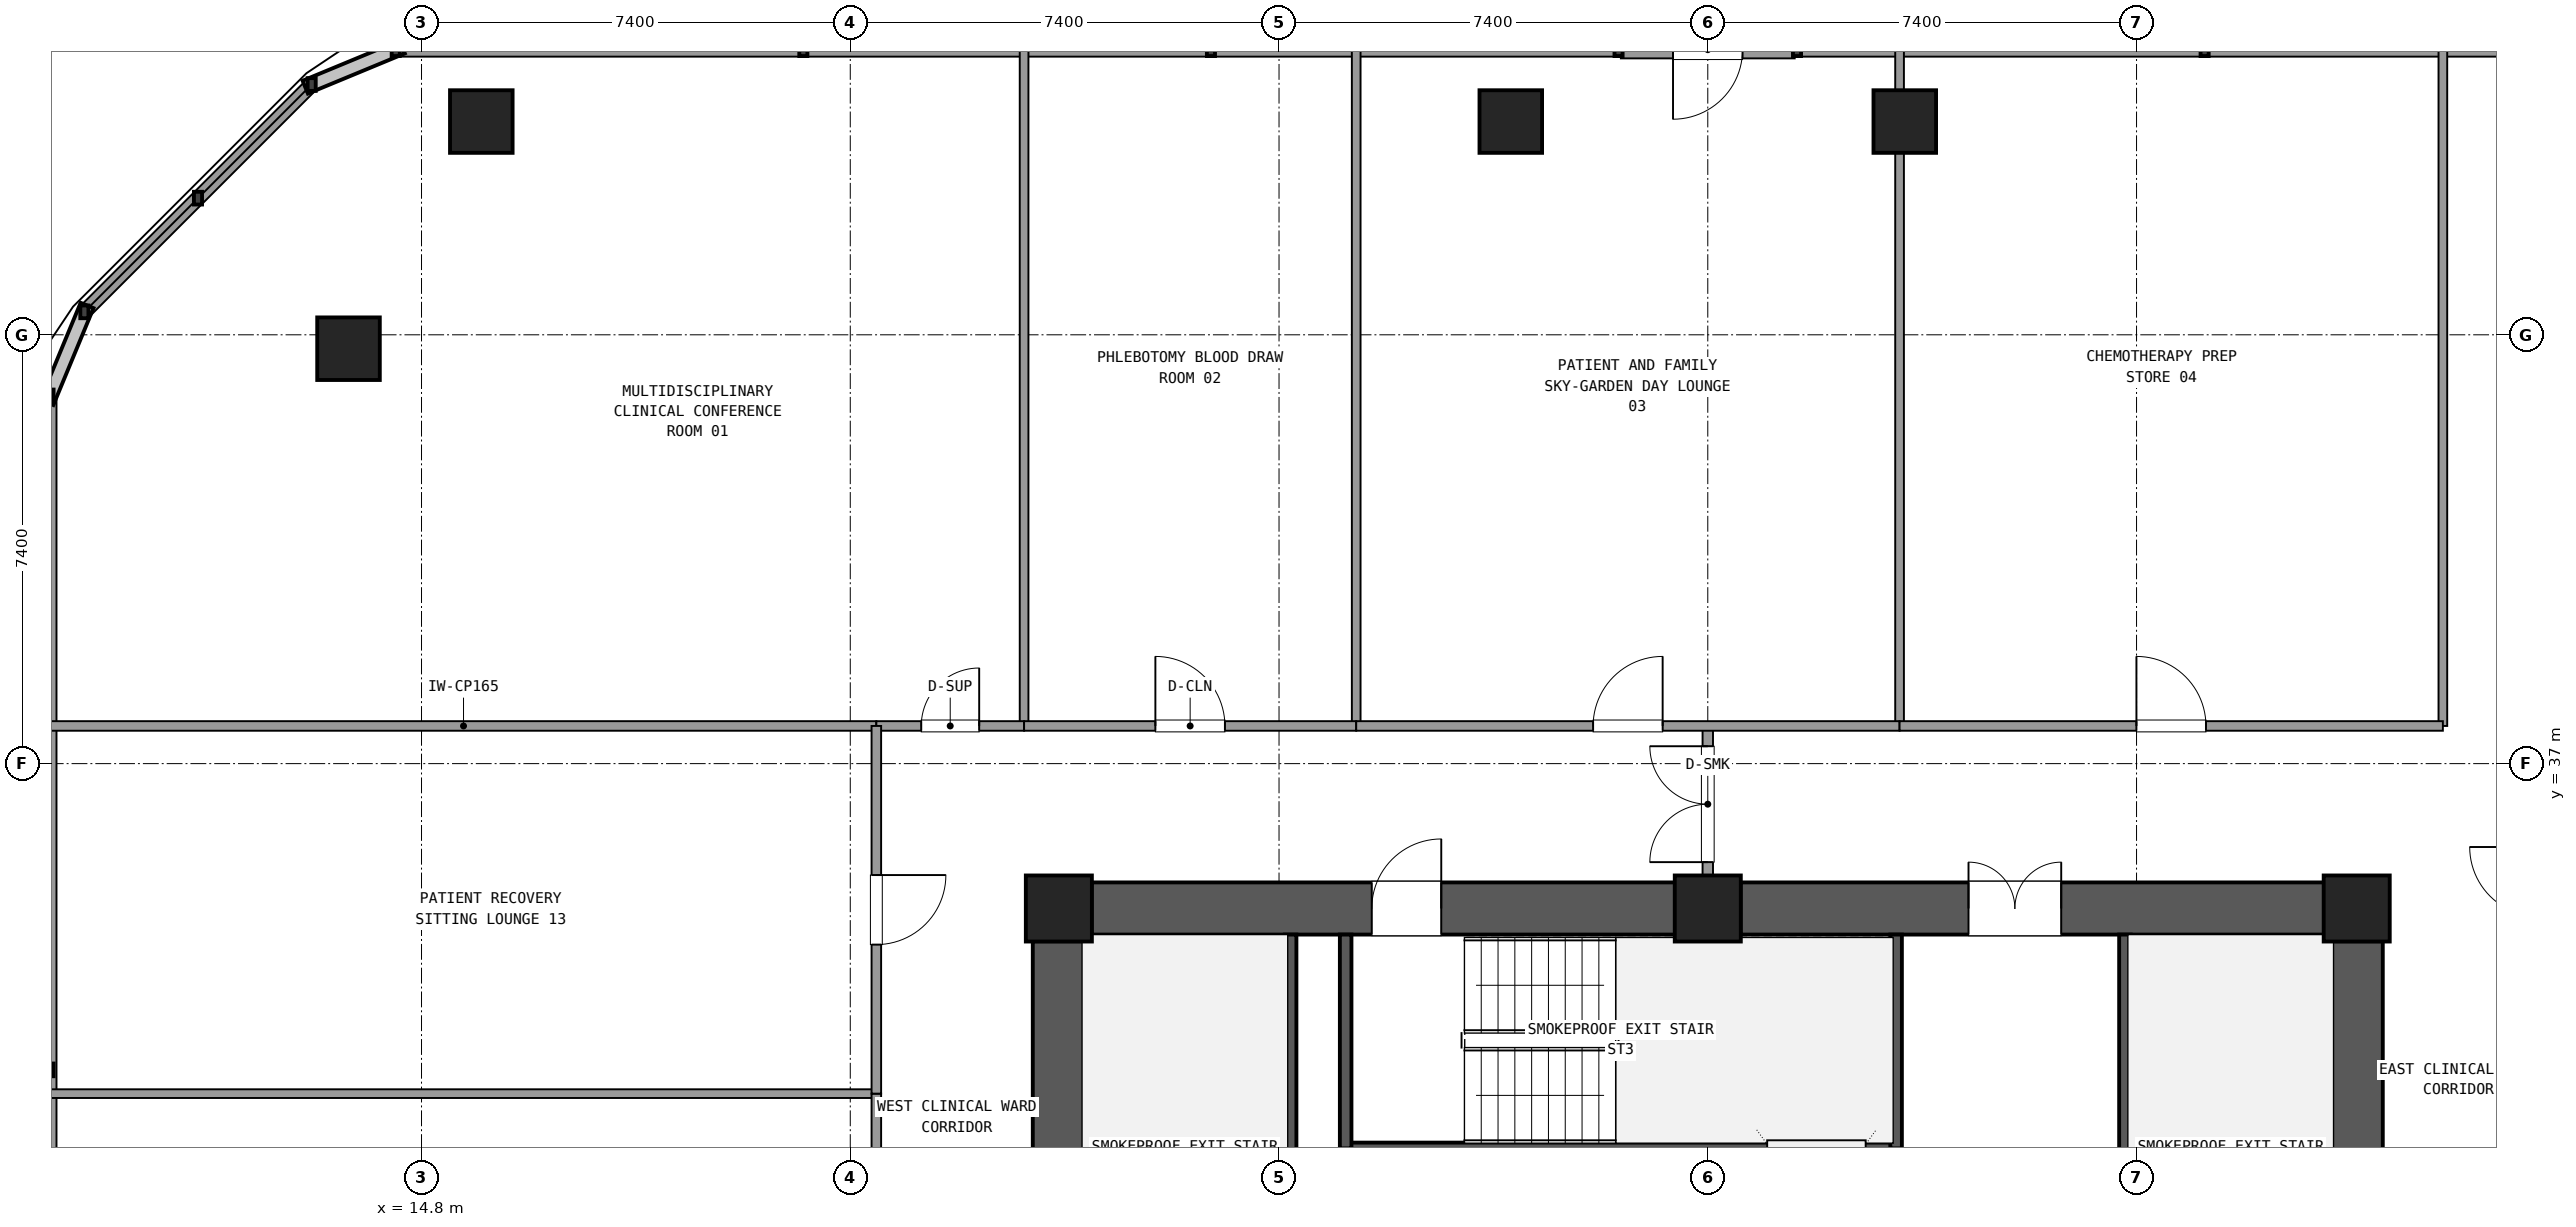
"""IFC4 building model, lengths in metres.
Left out: names, types, materials, properties, quantities, classifications, styles, units other than length and angle.
Written with IfcOpenShell. Run it as: python <this file> out.ifc"""

import sys

from ifc_helpers import new_model, si_unit, direction, frame, frame_2d, origin, origin_2d, place, context, subcontext, project, spatial, rectangle, extrude, element, fill, save


model = new_model("IFC4")
c1 = context("Model", 3, precision=1e-05, world=origin(), true_north=direction((0.0, 1.0)))
c2 = subcontext(c1, "Body", "Model", "MODEL_VIEW")
j1 = project(units=[si_unit("LENGTHUNIT", "METRE"), si_unit("PLANEANGLEUNIT", "RADIAN")], contexts=[c1])
p1 = place(None, origin())
s1 = spatial("IfcSite", under=j1, at=p1, CompositionType="ELEMENT")
p2 = place(p1, origin())
s2 = spatial("IfcBuilding", under=s1, at=p2, CompositionType="ELEMENT")
p3 = place(p2, frame((0.0, 0.0, 59.94)))
s3 = spatial("IfcBuildingStorey", under=s2, at=p3, CompositionType="ELEMENT", Elevation=59.94)
for number, where, z_axis, x_axis in (
    (1, (48.2, 34.5, 0.0), (0.0, 0.0, 1.0), (1.0, 0.0, 0.0)),
    (2, (37.0, 34.5, 0.0), (0.0, 0.0, 1.0), (1.0, 0.0, 0.0)),
    (3, (25.8, 34.5, 0.0), (0.0, 0.0, 1.0), (1.0, 0.0, 0.0)),
):
    element("IfcColumn", number, at=place(p3, frame(where, z_axis=z_axis, x_axis=x_axis)), inside=s3, PredefinedType="COLUMN", context=c2, shape_type="SweptSolid", body=[
        extrude(rectangle(XDim=1.14, YDim=1.14, at=origin_2d()), origin(), (0.0, 0.0, 1.0), 3.6),
    ])
p4 = place(p3, frame((48.2, 26.465, 0.0), z_axis=(0.0, 0.0, 1.0), x_axis=(0.0, 1.0, 0.0)))
e4 = element("IfcWall", 4, at=p4, inside=s3, PredefinedType="SHEAR", context=c2, shape_type="SweptSolid", body=[
    extrude(rectangle(XDim=7.47, YDim=0.9, at=frame_2d((3.735, 0.0))), origin(), (0.0, 0.0, 1.0), 3.32),
])
p5 = place(p3, frame((47.635, 34.5, 0.0), z_axis=(0.0, 0.0, 1.0), x_axis=(-1.0, 0.0, 0.0)))
e5 = element("IfcWall", 5, at=p5, inside=s3, PredefinedType="SHEAR", context=c2, shape_type="SweptSolid", body=[
    extrude(rectangle(XDim=10.07, YDim=0.9, at=frame_2d((5.035, 0.0))), origin(), (0.0, 0.0, 1.0), 3.32),
])
p6 = place(p5, frame((4.535, 0.0, 0.0)))
e6 = element("IfcOpeningElement", 6, at=p6, cuts=e5, PredefinedType="OPENING", context=c2, shape_type="SweptSolid", body=[
    extrude(rectangle(XDim=1.6, YDim=2.2, at=frame_2d((0.8, 1.1))), frame((0.0, 0.46, 0.0), z_axis=(0.0, -1.0, 0.0), x_axis=(1.0, 0.0, 0.0)), (0.0, 0.0, 1.0), 0.92),
])
p7 = place(p3, frame((36.435, 34.5, 0.0), z_axis=(0.0, 0.0, 1.0), x_axis=(-1.0, 0.0, 0.0)))
e7 = element("IfcWall", 7, at=p7, inside=s3, PredefinedType="SHEAR", context=c2, shape_type="SweptSolid", body=[
    extrude(rectangle(XDim=10.07, YDim=0.9, at=frame_2d((5.035, 0.0))), origin(), (0.0, 0.0, 1.0), 3.32),
])
p8 = place(p7, frame((4.035, 0.0, 0.0)))
e8 = element("IfcOpeningElement", 8, at=p8, cuts=e7, PredefinedType="OPENING", context=c2, shape_type="SweptSolid", body=[
    extrude(rectangle(XDim=1.2, YDim=2.15, at=frame_2d((0.6, 1.075))), frame((0.0, 0.46, 0.0), z_axis=(0.0, -1.0, 0.0), x_axis=(1.0, 0.0, 0.0)), (0.0, 0.0, 1.0), 0.92),
])
p9 = place(p3, frame((25.8, 33.935, 0.0), z_axis=(0.0, 0.0, 1.0), x_axis=(0.0, -1.0, 0.0)))
e9 = element("IfcWall", 9, at=p9, inside=s3, PredefinedType="SHEAR", context=c2, shape_type="SweptSolid", body=[
    extrude(rectangle(XDim=7.47, YDim=0.9, at=frame_2d((3.735, 0.0))), origin(), (0.0, 0.0, 1.0), 3.32),
])
for number, where, z_axis, x_axis in (
    (10, (40.4, 48.08, 0.0), (0.0, 0.0, 1.0), (1.0, 0.0, 0.0)),
    (11, (33.6, 48.08, 0.0), (0.0, 0.0, 1.0), (1.0, 0.0, 0.0)),
    (12, (15.832, 48.08, 0.0), (0.0, 0.0, 1.0), (1.0, 0.0, 0.0)),
    (13, (13.54, 44.16, 0.0), (0.0, 0.0, 1.0), (1.0, 0.0, 0.0)),
):
    element("IfcColumn", number, at=place(p3, frame(where, z_axis=z_axis, x_axis=x_axis)), inside=s3, PredefinedType="COLUMN", context=c2, shape_type="SweptSolid", body=[
        extrude(rectangle(XDim=1.08, YDim=1.08, at=origin_2d()), origin(), (0.0, 0.0, 1.0), 3.6),
    ])
p10 = place(p3, frame((38.5, 49.32, 0.0), z_axis=(0.0, 0.0, 1.0), x_axis=(-1.0, 0.0, 0.0)))
e14 = element("IfcWall", 14, at=p10, inside=s3, PredefinedType="SOLIDWALL", context=c2, shape_type="SweptSolid", body=[
    extrude(rectangle(XDim=3.0, YDim=0.3, at=frame_2d((1.5, 0.0))), origin(), (0.0, 0.0, 1.0), 2.65),
])
p11 = place(p10, frame((0.9, 0.0, 0.0)))
e15 = element("IfcOpeningElement", 15, at=p11, cuts=e14, PredefinedType="OPENING", context=c2, shape_type="SweptSolid", body=[
    extrude(rectangle(XDim=1.2, YDim=2.2, at=frame_2d((0.6, 1.1))), frame((0.0, 0.16, 0.0), z_axis=(0.0, -1.0, 0.0), x_axis=(1.0, 0.0, 0.0)), (0.0, 0.0, 1.0), 0.32),
])
for number, where, z_axis, x_axis in (
    (16, (59.645, 49.32, 0.0), (0.0, 0.0, 1.0), (-1.0, 0.0, 0.0)),
    (17, (35.46, 49.32, 0.0), (0.0, 0.0, 1.0), (-1.0, 0.0, 0.0)),
):
    element("IfcWall", number, at=place(p3, frame(where, z_axis=z_axis, x_axis=x_axis)), inside=s3, PredefinedType="SOLIDWALL", context=c2, shape_type="SweptSolid", body=[
        extrude(rectangle(XDim=21.105, YDim=0.24, at=frame_2d((10.552, 0.0))), origin(), (0.0, 0.0, 1.0), 0.85),
    ])
p12 = place(p3, frame((12.904, 48.719, 0.0), z_axis=(0.0, 0.0, 1.0), x_axis=(-0.707106781187, -0.707106781187, 0.0)))
e18 = element("IfcWall", 18, at=p12, inside=s3, PredefinedType="SOLIDWALL", context=c2, shape_type="SweptSolid", body=[
    extrude(rectangle(XDim=5.548, YDim=0.24, at=frame_2d((2.774, 0.0))), origin(), (0.0, 0.0, 1.0), 0.85),
])
p13 = place(p3, frame((8.38, 43.345, 0.0), z_axis=(0.0, 0.0, 1.0), x_axis=(0.0, -1.0, 0.0)))
e19 = element("IfcWall", 19, at=p13, inside=s3, PredefinedType="SOLIDWALL", context=c2, shape_type="SweptSolid", body=[
    extrude(rectangle(XDim=34.89, YDim=0.24, at=frame_2d((17.445, 0.0))), origin(), (0.0, 0.0, 1.0), 0.85),
])
for number, where, z_axis, x_axis in (
    (20, (29.8, 24.65, 0.0), (0.0, 0.0, 1.0), (0.0, 1.0, 0.0)),
    (21, (44.2, 24.65, 0.0), (0.0, 0.0, 1.0), (0.0, 1.0, 0.0)),
):
    element("IfcWall", number, at=place(p3, frame(where, z_axis=z_axis, x_axis=x_axis)), inside=s3, PredefinedType="SHEAR", context=c2, shape_type="SweptSolid", body=[
        extrude(rectangle(XDim=9.4, YDim=0.2, at=frame_2d((4.7, 0.0))), origin(), (0.0, 0.0, 1.0), 3.32),
    ])
p14 = place(p3, frame((30.75, 30.36, 0.0), z_axis=(0.0, 0.0, 1.0), x_axis=(1.0, 0.0, 0.0)))
e22 = element("IfcWall", 22, at=p14, inside=s3, PredefinedType="SHEAR", context=c2, shape_type="SweptSolid", body=[
    extrude(rectangle(XDim=9.5, YDim=0.2, at=frame_2d((4.75, 0.0))), origin(), (0.0, 0.0, 1.0), 3.32),
])
for number, where, z_axis, x_axis in (
    (23, (30.75, 30.36, 0.0), (0.0, 0.0, 1.0), (0.0, 1.0, 0.0)),
    (24, (40.25, 30.36, 0.0), (0.0, 0.0, 1.0), (0.0, 1.0, 0.0)),
):
    element("IfcWall", number, at=place(p3, frame(where, z_axis=z_axis, x_axis=x_axis)), inside=s3, PredefinedType="SHEAR", context=c2, shape_type="SweptSolid", body=[
        extrude(rectangle(XDim=3.69, YDim=0.2, at=frame_2d((1.845, 0.0))), origin(), (0.0, 0.0, 1.0), 3.32),
    ])
p15 = place(p3, frame((37.0, 34.95, 0.0), z_axis=(0.0, 0.0, 1.0), x_axis=(0.0, 1.0, 0.0)))
e25 = element("IfcWall", 25, at=p15, inside=s3, PredefinedType="PARTITIONING", context=c2, shape_type="SweptSolid", body=[
    extrude(rectangle(XDim=2.7, YDim=0.18, at=frame_2d((1.35, 0.0))), origin(), (0.0, 0.0, 1.0), 2.61),
])
p16 = place(p15, frame((0.35, 0.0, 0.0)))
e26 = element("IfcOpeningElement", 26, at=p16, cuts=e25, PredefinedType="OPENING", context=c2, shape_type="SweptSolid", body=[
    extrude(rectangle(XDim=2.0, YDim=2.2, at=frame_2d((1.0, 1.1))), frame((0.0, 0.1, 0.0), z_axis=(0.0, -1.0, 0.0), x_axis=(1.0, 0.0, 0.0)), (0.0, 0.0, 1.0), 0.2),
])
p17 = place(p3, frame((8.4, 37.65, 0.0), z_axis=(0.0, 0.0, 1.0), x_axis=(1.0, 0.0, 0.0)))
e27 = element("IfcWall", 27, at=p17, inside=s3, PredefinedType="PARTITIONING", context=c2, shape_type="SweptSolid", body=[
    extrude(rectangle(XDim=14.25, YDim=0.165, at=frame_2d((7.125, 0.0))), origin(), (0.0, 0.0, 1.0), 2.61),
])
p18 = place(p3, frame((25.2, 37.65, 0.0), z_axis=(0.0, 0.0, 1.0), x_axis=(0.0, 1.0, 0.0)))
e28 = element("IfcWall", 28, at=p18, inside=s3, PredefinedType="PARTITIONING", context=c2, shape_type="SweptSolid", body=[
    extrude(rectangle(XDim=11.65, YDim=0.15, at=frame_2d((5.825, 0.0))), origin(), (0.0, 0.0, 1.0), 2.61),
])
p19 = place(p3, frame((22.65, 37.65, 0.0), z_axis=(0.0, 0.0, 1.0), x_axis=(1.0, 0.0, 0.0)))
e29 = element("IfcWall", 29, at=p19, inside=s3, PredefinedType="PARTITIONING", context=c2, shape_type="SweptSolid", body=[
    extrude(rectangle(XDim=2.55, YDim=0.165, at=frame_2d((1.275, 0.0))), origin(), (0.0, 0.0, 1.0), 2.61),
])
p20 = place(p19, frame((0.775, 0.0, 0.0)))
e30 = element("IfcOpeningElement", 30, at=p20, cuts=e29, PredefinedType="OPENING", context=c2, shape_type="SweptSolid", body=[
    extrude(rectangle(XDim=1.0, YDim=2.15, at=frame_2d((0.5, 1.075))), frame((0.0, 0.093, 0.0), z_axis=(0.0, -1.0, 0.0), x_axis=(1.0, 0.0, 0.0)), (0.0, 0.0, 1.0), 0.185),
])
p21 = place(p3, frame((30.932, 37.65, 0.0), z_axis=(0.0, 0.0, 1.0), x_axis=(0.0, 1.0, 0.0)))
e31 = element("IfcWall", 31, at=p21, inside=s3, PredefinedType="PARTITIONING", context=c2, shape_type="SweptSolid", body=[
    extrude(rectangle(XDim=11.65, YDim=0.15, at=frame_2d((5.825, 0.0))), origin(), (0.0, 0.0, 1.0), 2.61),
])
p22 = place(p3, frame((25.2, 37.65, 0.0), z_axis=(0.0, 0.0, 1.0), x_axis=(1.0, 0.0, 0.0)))
e32 = element("IfcWall", 32, at=p22, inside=s3, PredefinedType="PARTITIONING", context=c2, shape_type="SweptSolid", body=[
    extrude(rectangle(XDim=5.732, YDim=0.165, at=frame_2d((2.866, 0.0))), origin(), (0.0, 0.0, 1.0), 2.61),
])
p23 = place(p22, frame((2.266, 0.0, 0.0)))
e33 = element("IfcOpeningElement", 33, at=p23, cuts=e32, PredefinedType="OPENING", context=c2, shape_type="SweptSolid", body=[
    extrude(rectangle(XDim=1.2, YDim=2.15, at=frame_2d((0.6, 1.075))), frame((0.0, 0.093, 0.0), z_axis=(0.0, -1.0, 0.0), x_axis=(1.0, 0.0, 0.0)), (0.0, 0.0, 1.0), 0.185),
])
p24 = place(p3, frame((40.31, 37.65, 0.0), z_axis=(0.0, 0.0, 1.0), x_axis=(0.0, 1.0, 0.0)))
e34 = element("IfcWall", 34, at=p24, inside=s3, PredefinedType="PARTITIONING", context=c2, shape_type="SweptSolid", body=[
    extrude(rectangle(XDim=11.65, YDim=0.15, at=frame_2d((5.825, 0.0))), origin(), (0.0, 0.0, 1.0), 2.61),
])
p25 = place(p3, frame((30.932, 37.65, 0.0), z_axis=(0.0, 0.0, 1.0), x_axis=(1.0, 0.0, 0.0)))
e35 = element("IfcWall", 35, at=p25, inside=s3, PredefinedType="PARTITIONING", context=c2, shape_type="SweptSolid", body=[
    extrude(rectangle(XDim=9.378, YDim=0.165, at=frame_2d((4.689, 0.0))), origin(), (0.0, 0.0, 1.0), 2.61),
])
p26 = place(p25, frame((4.089, 0.0, 0.0)))
e36 = element("IfcOpeningElement", 36, at=p26, cuts=e35, PredefinedType="OPENING", context=c2, shape_type="SweptSolid", body=[
    extrude(rectangle(XDim=1.2, YDim=2.15, at=frame_2d((0.6, 1.075))), frame((0.0, 0.093, 0.0), z_axis=(0.0, -1.0, 0.0), x_axis=(1.0, 0.0, 0.0)), (0.0, 0.0, 1.0), 0.185),
])
p27 = place(p3, frame((49.687, 37.65, 0.0), z_axis=(0.0, 0.0, 1.0), x_axis=(0.0, 1.0, 0.0)))
e37 = element("IfcWall", 37, at=p27, inside=s3, PredefinedType="PARTITIONING", context=c2, shape_type="SweptSolid", body=[
    extrude(rectangle(XDim=11.65, YDim=0.15, at=frame_2d((5.825, 0.0))), origin(), (0.0, 0.0, 1.0), 2.61),
])
p28 = place(p3, frame((40.31, 37.65, 0.0), z_axis=(0.0, 0.0, 1.0), x_axis=(1.0, 0.0, 0.0)))
e38 = element("IfcWall", 38, at=p28, inside=s3, PredefinedType="PARTITIONING", context=c2, shape_type="SweptSolid", body=[
    extrude(rectangle(XDim=9.377, YDim=0.165, at=frame_2d((4.688, 0.0))), origin(), (0.0, 0.0, 1.0), 2.61),
])
p29 = place(p28, frame((4.088, 0.0, 0.0)))
e39 = element("IfcOpeningElement", 39, at=p29, cuts=e38, PredefinedType="OPENING", context=c2, shape_type="SweptSolid", body=[
    extrude(rectangle(XDim=1.2, YDim=2.15, at=frame_2d((0.6, 1.075))), frame((0.0, 0.093, 0.0), z_axis=(0.0, -1.0, 0.0), x_axis=(1.0, 0.0, 0.0)), (0.0, 0.0, 1.0), 0.185),
])
p30 = place(p3, frame((22.65, 31.305, 0.0), z_axis=(0.0, 0.0, 1.0), x_axis=(-1.0, 0.0, 0.0)))
e40 = element("IfcWall", 40, at=p30, inside=s3, PredefinedType="PARTITIONING", context=c2, shape_type="SweptSolid", body=[
    extrude(rectangle(XDim=14.25, YDim=0.15, at=frame_2d((7.125, 0.0))), origin(), (0.0, 0.0, 1.0), 2.61),
])
p31 = place(p3, frame((22.65, 23.315, 0.0), z_axis=(0.0, 0.0, 1.0), x_axis=(0.0, 1.0, 0.0)))
e41 = element("IfcWall", 41, at=p31, inside=s3, PredefinedType="PARTITIONING", context=c2, shape_type="SweptSolid", body=[
    extrude(rectangle(XDim=7.99, YDim=0.165, at=frame_2d((3.995, 0.0))), origin(), (0.0, 0.0, 1.0), 2.61),
])
p32 = place(p31, frame((3.395, 0.0, 0.0)))
e42 = element("IfcOpeningElement", 42, at=p32, cuts=e41, PredefinedType="OPENING", context=c2, shape_type="SweptSolid", body=[
    extrude(rectangle(XDim=1.2, YDim=2.15, at=frame_2d((0.6, 1.075))), frame((0.0, 0.093, 0.0), z_axis=(0.0, -1.0, 0.0), x_axis=(1.0, 0.0, 0.0)), (0.0, 0.0, 1.0), 0.185),
])
p33 = place(p3, frame((22.65, 31.305, 0.0), z_axis=(0.0, 0.0, 1.0), x_axis=(0.0, 1.0, 0.0)))
e43 = element("IfcWall", 43, at=p33, inside=s3, PredefinedType="PARTITIONING", context=c2, shape_type="SweptSolid", body=[
    extrude(rectangle(XDim=6.345, YDim=0.165, at=frame_2d((3.172, 0.0))), origin(), (0.0, 0.0, 1.0), 2.61),
])
p34 = place(p33, frame((2.572, 0.0, 0.0)))
e44 = element("IfcOpeningElement", 44, at=p34, cuts=e43, PredefinedType="OPENING", context=c2, shape_type="SweptSolid", body=[
    extrude(rectangle(XDim=1.2, YDim=2.15, at=frame_2d((0.6, 1.075))), frame((0.0, 0.093, 0.0), z_axis=(0.0, -1.0, 0.0), x_axis=(1.0, 0.0, 0.0)), (0.0, 0.0, 1.0), 0.185),
])
p35 = place(p6, frame((1.6, 0.0, 0.0), z_axis=(0.0, 0.0, 1.0), x_axis=(-1.0, 0.0, 0.0)))
e45 = element("IfcDoor", 45, at=p35, inside=s3, OperationType="DOUBLE_DOOR_SINGLE_SWING", PredefinedType="DOOR", context=c2, shape_type="SweptSolid", body=[
    extrude(rectangle(XDim=1.6, YDim=2.2, at=frame_2d((0.8, 1.1))), frame((0.0, 0.025, 0.0), z_axis=(0.0, -1.0, 0.0), x_axis=(1.0, 0.0, 0.0)), (0.0, 0.0, 1.0), 0.05),
])
fill(e6, e45)
p36 = place(p8, frame((1.2, 0.0, 0.0), z_axis=(0.0, 0.0, 1.0), x_axis=(-1.0, 0.0, 0.0)))
e46 = element("IfcDoor", 46, at=p36, inside=s3, OperationType="SINGLE_SWING_LEFT", PredefinedType="DOOR", context=c2, shape_type="SweptSolid", body=[
    extrude(rectangle(XDim=1.2, YDim=2.15, at=frame_2d((0.6, 1.075))), frame((0.0, 0.025, 0.0), z_axis=(0.0, -1.0, 0.0), x_axis=(1.0, 0.0, 0.0)), (0.0, 0.0, 1.0), 0.05),
])
fill(e8, e46)
p37 = place(p16, origin())
e47 = element("IfcDoor", 47, at=p37, inside=s3, OperationType="DOUBLE_DOOR_SINGLE_SWING", PredefinedType="DOOR", context=c2, shape_type="SweptSolid", body=[
    extrude(rectangle(XDim=2.0, YDim=2.2, at=frame_2d((1.0, 1.1))), frame((0.0, 0.025, 0.0), z_axis=(0.0, -1.0, 0.0), x_axis=(1.0, 0.0, 0.0)), (0.0, 0.0, 1.0), 0.05),
])
fill(e26, e47)
p38 = place(p20, origin())
e48 = element("IfcDoor", 48, at=p38, inside=s3, OperationType="SINGLE_SWING_RIGHT", PredefinedType="DOOR", context=c2, shape_type="SweptSolid", body=[
    extrude(rectangle(XDim=1.0, YDim=2.15, at=frame_2d((0.5, 1.075))), frame((0.0, 0.025, 0.0), z_axis=(0.0, -1.0, 0.0), x_axis=(1.0, 0.0, 0.0)), (0.0, 0.0, 1.0), 0.05),
])
fill(e30, e48)
p39 = place(p23, origin())
e49 = element("IfcDoor", 49, at=p39, inside=s3, OperationType="SINGLE_SWING_LEFT", PredefinedType="DOOR", context=c2, shape_type="SweptSolid", body=[
    extrude(rectangle(XDim=1.2, YDim=2.15, at=frame_2d((0.6, 1.075))), frame((0.0, 0.025, 0.0), z_axis=(0.0, -1.0, 0.0), x_axis=(1.0, 0.0, 0.0)), (0.0, 0.0, 1.0), 0.05),
])
fill(e33, e49)
p40 = place(p26, origin())
e50 = element("IfcDoor", 50, at=p40, inside=s3, OperationType="SINGLE_SWING_RIGHT", PredefinedType="DOOR", context=c2, shape_type="SweptSolid", body=[
    extrude(rectangle(XDim=1.2, YDim=2.15, at=frame_2d((0.6, 1.075))), frame((0.0, 0.025, 0.0), z_axis=(0.0, -1.0, 0.0), x_axis=(1.0, 0.0, 0.0)), (0.0, 0.0, 1.0), 0.05),
])
fill(e36, e50)
p41 = place(p29, origin())
e51 = element("IfcDoor", 51, at=p41, inside=s3, OperationType="SINGLE_SWING_LEFT", PredefinedType="DOOR", context=c2, shape_type="SweptSolid", body=[
    extrude(rectangle(XDim=1.2, YDim=2.15, at=frame_2d((0.6, 1.075))), frame((0.0, 0.025, 0.0), z_axis=(0.0, -1.0, 0.0), x_axis=(1.0, 0.0, 0.0)), (0.0, 0.0, 1.0), 0.05),
])
fill(e39, e51)
p42 = place(p34, frame((1.2, 0.0, 0.0), z_axis=(0.0, 0.0, 1.0), x_axis=(-1.0, 0.0, 0.0)))
e52 = element("IfcDoor", 52, at=p42, inside=s3, OperationType="SINGLE_SWING_RIGHT", PredefinedType="DOOR", context=c2, shape_type="SweptSolid", body=[
    extrude(rectangle(XDim=1.2, YDim=2.15, at=frame_2d((0.6, 1.075))), frame((0.0, 0.025, 0.0), z_axis=(0.0, -1.0, 0.0), x_axis=(1.0, 0.0, 0.0)), (0.0, 0.0, 1.0), 0.05),
])
fill(e44, e52)
save(model, sys.argv[1])
